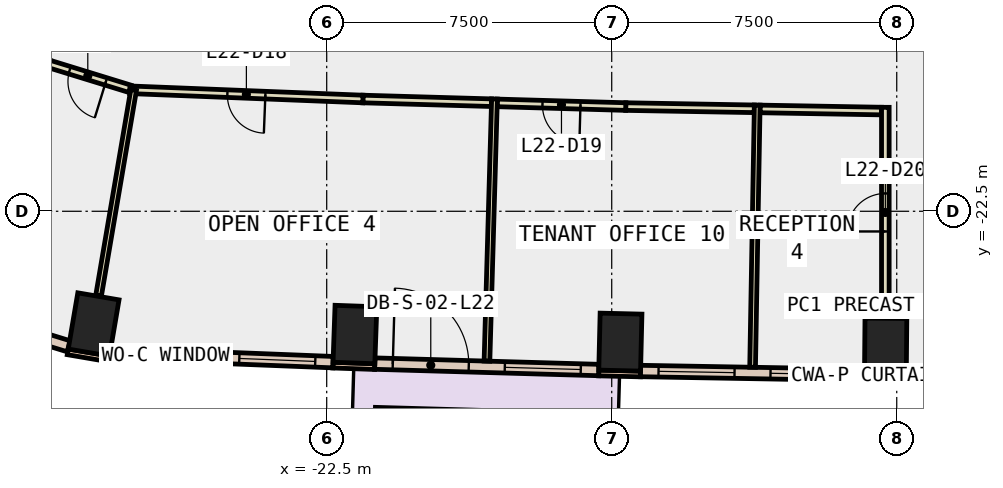
"""IFC4 building model, lengths in metres.
Left out: names, types, materials, properties, quantities, classifications, styles, units other than length and angle.
Written with IfcOpenShell. Run it as: python <this file> out.ifc"""

import sys

from ifc_helpers import new_model, si_unit, direction, frame, frame_2d, origin, origin_2d, place, context, subcontext, project, spatial, rectangle, extrude, element, fill, save


model = new_model("IFC4")
c1 = context("Model", 3, precision=1e-05, world=origin(), true_north=direction((0.0, 1.0)))
c2 = subcontext(c1, "Body", "Model", "MODEL_VIEW")
j1 = project(units=[si_unit("LENGTHUNIT", "METRE"), si_unit("PLANEANGLEUNIT", "RADIAN")], contexts=[c1])
p1 = place(None, origin())
s1 = spatial("IfcSite", under=j1, at=p1, CompositionType="ELEMENT")
p2 = place(p1, origin())
s2 = spatial("IfcBuilding", under=s1, at=p2, CompositionType="ELEMENT")
p3 = place(p2, frame((0.0, 0.0, 103.4)))
s3 = spatial("IfcBuildingStorey", under=s2, at=p3, CompositionType="ELEMENT", Elevation=103.4)
for number, where, z_axis, x_axis in (
    (1, (-28.633, -25.478, -0.4), (0.0, 0.0, 1.0), (-0.986, 0.168, 0.0)),
    (2, (-21.757, -25.743, -0.4), (0.0, 0.0, 1.0), (-0.999, 0.035, 0.0)),
    (3, (-14.773, -25.943, -0.4), (0.0, 0.0, 1.0), (-1.0, 0.024, 0.0)),
    (4, (-7.792, -26.066, -0.4), (0.0, 0.0, 1.0), (-1.0, 0.009, 0.0)),
):
    element("IfcColumn", number, at=place(p3, frame(where, z_axis=z_axis, x_axis=x_axis)), inside=s3, PredefinedType="COLUMN", context=c2, shape_type="SweptSolid", body=[
        extrude(rectangle(XDim=1.1, YDim=1.5, at=origin_2d()), origin(), (0.0, 0.0, 1.0), 4.2),
    ])
p4 = place(p3, frame((-29.314, -26.199, 0.0), z_axis=(0.0, 0.0, 1.0), x_axis=(0.985763338892, -0.168138751323, 0.0)))
e5 = element("IfcWall", 5, at=p4, inside=s3, PredefinedType="STANDARD", context=c2, shape_type="SweptSolid", body=[
    extrude(rectangle(XDim=1.101, YDim=0.15, at=frame_2d((0.55, 0.0))), origin(), (0.0, 0.0, 1.0), 3.8),
])
p5 = place(p3, frame((-22.336, -26.548, 0.0), z_axis=(0.0, 0.0, 1.0), x_axis=(0.999376638472, -0.035303462679, 0.0)))
e6 = element("IfcWall", 6, at=p5, inside=s3, PredefinedType="STANDARD", context=c2, shape_type="SweptSolid", body=[
    extrude(rectangle(XDim=1.1, YDim=0.15, at=frame_2d((0.55, 0.0))), origin(), (0.0, 0.0, 1.0), 3.8),
])
p6 = place(p3, frame((-15.343, -26.755, 0.0), z_axis=(0.0, 0.0, 1.0), x_axis=(0.999718180159, -0.023739424163, 0.0)))
e7 = element("IfcWall", 7, at=p6, inside=s3, PredefinedType="STANDARD", context=c2, shape_type="SweptSolid", body=[
    extrude(rectangle(XDim=1.1, YDim=0.15, at=frame_2d((0.55, 0.0))), origin(), (0.0, 0.0, 1.0), 3.8),
])
p7 = place(p3, frame((-8.349, -26.886, 0.0), z_axis=(0.0, 0.0, 1.0), x_axis=(0.99995860686, -0.009098602504, 0.0)))
e8 = element("IfcWall", 8, at=p7, inside=s3, PredefinedType="STANDARD", context=c2, shape_type="SweptSolid", body=[
    extrude(rectangle(XDim=1.1, YDim=0.15, at=frame_2d((0.55, 0.0))), origin(), (0.0, 0.0, 1.0), 3.8),
])
p8 = place(p3, frame((-28.205, -26.238, 0.0), z_axis=(0.0, 0.0, 1.0), x_axis=(0.99922113396, -0.039460428885, 0.0)))
e9 = element("IfcWall", 9, at=p8, inside=s3, PredefinedType="STANDARD", context=c2, shape_type="SweptSolid", body=[
    extrude(rectangle(XDim=5.878, YDim=0.3, at=frame_2d((2.939, 0.0))), origin(), (0.0, 0.0, 1.0), 3.8),
])
p9 = place(p8, frame((0.469, 0.0, 0.9)))
e10 = element("IfcOpeningElement", 10, at=p9, cuts=e9, PredefinedType="OPENING", context=c2, shape_type="SweptSolid", body=[
    extrude(rectangle(XDim=2.0, YDim=2.6, at=frame_2d((1.0, 1.3))), frame((0.0, 0.16, 0.0), z_axis=(0.0, -1.0, 0.0), x_axis=(1.0, 0.0, 0.0)), (0.0, 0.0, 1.0), 0.32),
])
p10 = place(p8, frame((3.408, 0.0, 0.9)))
e11 = element("IfcOpeningElement", 11, at=p10, cuts=e9, PredefinedType="OPENING", context=c2, shape_type="SweptSolid", body=[
    extrude(rectangle(XDim=2.0, YDim=2.6, at=frame_2d((1.0, 1.3))), frame((0.0, 0.16, 0.0), z_axis=(0.0, -1.0, 0.0), x_axis=(1.0, 0.0, 0.0)), (0.0, 0.0, 1.0), 0.32),
])
p11 = place(p3, frame((-21.235, -26.508, 0.0), z_axis=(0.0, 0.0, 1.0), x_axis=(0.999589583914, -0.028647229026, 0.0)))
e12 = element("IfcWall", 12, at=p11, inside=s3, PredefinedType="STANDARD", context=c2, shape_type="SweptSolid", body=[
    extrude(rectangle(XDim=5.897, YDim=0.3, at=frame_2d((2.949, 0.0))), origin(), (0.0, 0.0, 1.0), 3.8),
])
p12 = place(p11, frame((0.474, 0.0, 0.0)))
e13 = element("IfcOpeningElement", 13, at=p12, cuts=e12, PredefinedType="OPENING", context=c2, shape_type="SweptSolid", body=[
    extrude(rectangle(XDim=2.0, YDim=2.4, at=frame_2d((1.0, 1.2))), frame((0.0, 0.16, 0.0), z_axis=(0.0, -1.0, 0.0), x_axis=(1.0, 0.0, 0.0)), (0.0, 0.0, 1.0), 0.32),
])
p13 = place(p11, frame((3.423, 0.0, 0.9)))
e14 = element("IfcOpeningElement", 14, at=p13, cuts=e12, PredefinedType="OPENING", context=c2, shape_type="SweptSolid", body=[
    extrude(rectangle(XDim=2.0, YDim=2.6, at=frame_2d((1.0, 1.3))), frame((0.0, 0.16, 0.0), z_axis=(0.0, -1.0, 0.0), x_axis=(1.0, 0.0, 0.0)), (0.0, 0.0, 1.0), 0.32),
])
p14 = place(p3, frame((-14.242, -26.703, 0.0), z_axis=(0.0, 0.0, 1.0), x_axis=(0.999847261365, -0.017477240672, 0.0)))
e15 = element("IfcWall", 15, at=p14, inside=s3, PredefinedType="STANDARD", context=c2, shape_type="SweptSolid", body=[
    extrude(rectangle(XDim=5.895, YDim=0.3, at=frame_2d((2.948, 0.0))), origin(), (0.0, 0.0, 1.0), 3.8),
])
p15 = place(p14, frame((0.474, 0.0, 0.9)))
e16 = element("IfcOpeningElement", 16, at=p15, cuts=e15, PredefinedType="OPENING", context=c2, shape_type="SweptSolid", body=[
    extrude(rectangle(XDim=2.0, YDim=2.6, at=frame_2d((1.0, 1.3))), frame((0.0, 0.16, 0.0), z_axis=(0.0, -1.0, 0.0), x_axis=(1.0, 0.0, 0.0)), (0.0, 0.0, 1.0), 0.32),
])
p16 = place(p14, frame((3.421, 0.0, 0.9)))
e17 = element("IfcOpeningElement", 17, at=p16, cuts=e15, PredefinedType="OPENING", context=c2, shape_type="SweptSolid", body=[
    extrude(rectangle(XDim=2.0, YDim=2.6, at=frame_2d((1.0, 1.3))), frame((0.0, 0.16, 0.0), z_axis=(0.0, -1.0, 0.0), x_axis=(1.0, 0.0, 0.0)), (0.0, 0.0, 1.0), 0.32),
])
p17 = place(p3, frame((-32.924, -24.935, 0.0), z_axis=(0.0, 0.0, 1.0), x_axis=(0.955841433148, -0.293882892794, 0.0)))
e18 = element("IfcWall", 18, at=p17, inside=s3, PredefinedType="STANDARD", context=c2, shape_type="SweptSolid", body=[
    extrude(rectangle(XDim=3.804, YDim=0.3, at=frame_2d((1.902, 0.0))), origin(), (0.0, 0.0, 1.0), 3.8),
])
p18 = place(p17, frame((1.202, 0.0, 0.9)))
e19 = element("IfcOpeningElement", 19, at=p18, cuts=e18, PredefinedType="OPENING", context=c2, shape_type="SweptSolid", body=[
    extrude(rectangle(XDim=1.4, YDim=2.6, at=frame_2d((0.7, 1.3))), frame((0.0, 0.16, 0.0), z_axis=(0.0, -1.0, 0.0), x_axis=(1.0, 0.0, 0.0)), (0.0, 0.0, 1.0), 0.32),
])
p19 = place(p3, frame((-21.229, -28.059, 0.0), z_axis=(0.0, 0.0, 1.0), x_axis=(0.999589746939, -0.028641540027, 0.0)))
e20 = element("IfcWall", 20, at=p19, inside=s3, PredefinedType="STANDARD", context=c2, shape_type="SweptSolid", body=[
    extrude(rectangle(XDim=5.796, YDim=0.8, at=frame_2d((2.898, 0.0))), origin(), (0.0, 0.0, 1.0), 0.8),
])
p20 = place(p3, frame((-27.676, -19.278, 0.0), z_axis=(0.0, 0.0, 1.0), x_axis=(-0.95581080774, 0.293982482143, 0.0)))
e21 = element("IfcWall", 21, at=p20, inside=s3, PredefinedType="PARTITIONING", context=c2, shape_type="SweptSolid", body=[
    extrude(rectangle(XDim=2.324, YDim=0.2, at=frame_2d((1.162, 0.0))), origin(), (0.0, 0.0, 1.0), 3.8),
])
p21 = place(p20, frame((0.662, 0.0, 0.0)))
e22 = element("IfcOpeningElement", 22, at=p21, cuts=e21, PredefinedType="OPENING", context=c2, shape_type="SweptSolid", body=[
    extrude(rectangle(XDim=1.0, YDim=2.1, at=frame_2d((0.5, 1.05))), frame((0.0, 0.11, 0.0), z_axis=(0.0, -1.0, 0.0), x_axis=(1.0, 0.0, 0.0)), (0.0, 0.0, 1.0), 0.22),
])
p22 = place(p3, frame((-18.163, -19.643, 0.0), z_axis=(0.0, 0.0, 1.0), x_axis=(-0.999588017684, 0.028701827504, 0.0)))
e23 = element("IfcWall", 23, at=p22, inside=s3, PredefinedType="PARTITIONING", context=c2, shape_type="SweptSolid", body=[
    extrude(rectangle(XDim=3.385, YDim=0.2, at=frame_2d((1.693, 0.0))), origin(), (0.0, 0.0, 1.0), 3.8),
])
p23 = place(p3, frame((-21.547, -19.546, 0.0), z_axis=(0.0, 0.0, 1.0), x_axis=(-0.999216450883, 0.039578836331, 0.0)))
e24 = element("IfcWall", 24, at=p23, inside=s3, PredefinedType="PARTITIONING", context=c2, shape_type="SweptSolid", body=[
    extrude(rectangle(XDim=6.138, YDim=0.2, at=frame_2d((3.069, 0.0))), origin(), (0.0, 0.0, 1.0), 3.8),
])
p24 = place(p23, frame((2.569, 0.0, 0.0)))
e25 = element("IfcOpeningElement", 25, at=p24, cuts=e24, PredefinedType="OPENING", context=c2, shape_type="SweptSolid", body=[
    extrude(rectangle(XDim=1.0, YDim=2.1, at=frame_2d((0.5, 1.05))), frame((0.0, 0.11, 0.0), z_axis=(0.0, -1.0, 0.0), x_axis=(1.0, 0.0, 0.0)), (0.0, 0.0, 1.0), 0.22),
])
p25 = place(p3, frame((-11.248, -19.804, 0.0), z_axis=(0.0, 0.0, 1.0), x_axis=(-0.999848794654, 0.017389302123, 0.0)))
e26 = element("IfcWall", 26, at=p25, inside=s3, PredefinedType="PARTITIONING", context=c2, shape_type="SweptSolid", body=[
    extrude(rectangle(XDim=3.384, YDim=0.2, at=frame_2d((1.692, 0.0))), origin(), (0.0, 0.0, 1.0), 3.8),
])
p26 = place(p3, frame((-14.631, -19.745, 0.0), z_axis=(0.0, 0.0, 1.0), x_axis=(-0.999587482491, 0.028720460441, 0.0)))
e27 = element("IfcWall", 27, at=p26, inside=s3, PredefinedType="PARTITIONING", context=c2, shape_type="SweptSolid", body=[
    extrude(rectangle(XDim=3.383, YDim=0.2, at=frame_2d((1.692, 0.0))), origin(), (0.0, 0.0, 1.0), 3.8),
])
p27 = place(p26, frame((1.192, 0.0, 0.0)))
e28 = element("IfcOpeningElement", 28, at=p27, cuts=e27, PredefinedType="OPENING", context=c2, shape_type="SweptSolid", body=[
    extrude(rectangle(XDim=1.0, YDim=2.1, at=frame_2d((0.5, 1.05))), frame((0.0, 0.11, 0.0), z_axis=(0.0, -1.0, 0.0), x_axis=(1.0, 0.0, 0.0)), (0.0, 0.0, 1.0), 0.22),
])
p28 = place(p3, frame((-7.9, -19.863, 0.0), z_axis=(0.0, 0.0, 1.0), x_axis=(-0.999845883554, 0.017555886191, 0.0)))
e29 = element("IfcWall", 29, at=p28, inside=s3, PredefinedType="PARTITIONING", context=c2, shape_type="SweptSolid", body=[
    extrude(rectangle(XDim=3.198, YDim=0.2, at=frame_2d((1.599, 0.0))), origin(), (0.0, 0.0, 1.0), 3.8),
])
p29 = place(p3, frame((-7.8, -25.296, 0.0), z_axis=(0.0, 0.0, 1.0), x_axis=(0.0, 1.0, 0.0)))
e30 = element("IfcWall", 30, at=p29, inside=s3, PredefinedType="PARTITIONING", context=c2, shape_type="SweptSolid", body=[
    extrude(rectangle(XDim=5.531, YDim=0.2, at=frame_2d((2.766, 0.0))), origin(), (0.0, 0.0, 1.0), 3.8),
])
p30 = place(p29, frame((2.265, 0.0, 0.0)))
e31 = element("IfcOpeningElement", 31, at=p30, cuts=e30, PredefinedType="OPENING", context=c2, shape_type="SweptSolid", body=[
    extrude(rectangle(XDim=1.0, YDim=2.1, at=frame_2d((0.5, 1.05))), frame((0.0, 0.11, 0.0), z_axis=(0.0, -1.0, 0.0), x_axis=(1.0, 0.0, 0.0)), (0.0, 0.0, 1.0), 0.22),
])
p31 = place(p3, frame((-27.58, -19.307, 0.0), z_axis=(0.0, 0.0, 1.0), x_axis=(-0.168089900424, -0.98577167, 0.0)))
e32 = element("IfcWall", 32, at=p31, inside=s3, PredefinedType="PARTITIONING", context=c2, shape_type="SweptSolid", body=[
    extrude(rectangle(XDim=5.49, YDim=0.15, at=frame_2d((2.745, 0.0))), origin(), (0.0, 0.0, 1.0), 3.8),
])
p32 = place(p3, frame((-18.085, -19.545, 0.0), z_axis=(0.0, 0.0, 1.0), x_axis=(-0.02869106823, -0.999588326564, 0.0)))
e33 = element("IfcWall", 33, at=p32, inside=s3, PredefinedType="PARTITIONING", context=c2, shape_type="SweptSolid", body=[
    extrude(rectangle(XDim=6.901, YDim=0.15, at=frame_2d((3.451, 0.0))), origin(), (0.0, 0.0, 1.0), 3.8),
])
p33 = place(p3, frame((-11.171, -19.706, 0.0), z_axis=(0.0, 0.0, 1.0), x_axis=(-0.017691335128, -0.999843496084, 0.0)))
e34 = element("IfcWall", 34, at=p33, inside=s3, PredefinedType="PARTITIONING", context=c2, shape_type="SweptSolid", body=[
    extrude(rectangle(XDim=6.9, YDim=0.15, at=frame_2d((3.45, 0.0))), origin(), (0.0, 0.0, 1.0), 3.8),
])
p34 = place(p9, origin())
e35 = element("IfcWindow", 35, at=p34, inside=s3, PartitioningType="SINGLE_PANEL", PredefinedType="WINDOW", context=c2, shape_type="SweptSolid", body=[
    extrude(rectangle(XDim=2.0, YDim=2.6, at=frame_2d((1.0, 1.3))), frame((0.0, 0.03, 0.0), z_axis=(0.0, -1.0, 0.0), x_axis=(1.0, 0.0, 0.0)), (0.0, 0.0, 1.0), 0.06),
])
fill(e10, e35)
p35 = place(p10, origin())
e36 = element("IfcWindow", 36, at=p35, inside=s3, PartitioningType="SINGLE_PANEL", PredefinedType="WINDOW", context=c2, shape_type="SweptSolid", body=[
    extrude(rectangle(XDim=2.0, YDim=2.6, at=frame_2d((1.0, 1.3))), frame((0.0, 0.03, 0.0), z_axis=(0.0, -1.0, 0.0), x_axis=(1.0, 0.0, 0.0)), (0.0, 0.0, 1.0), 0.06),
])
fill(e11, e36)
p36 = place(p12, origin())
e37 = element("IfcDoor", 37, at=p36, inside=s3, OperationType="SLIDING_TO_LEFT", PredefinedType="DOOR", context=c2, shape_type="SweptSolid", body=[
    extrude(rectangle(XDim=2.0, YDim=2.4, at=frame_2d((1.0, 1.2))), frame((0.0, 0.025, 0.0), z_axis=(0.0, -1.0, 0.0), x_axis=(1.0, 0.0, 0.0)), (0.0, 0.0, 1.0), 0.05),
])
fill(e13, e37)
p37 = place(p13, origin())
e38 = element("IfcWindow", 38, at=p37, inside=s3, PartitioningType="SINGLE_PANEL", PredefinedType="WINDOW", context=c2, shape_type="SweptSolid", body=[
    extrude(rectangle(XDim=2.0, YDim=2.6, at=frame_2d((1.0, 1.3))), frame((0.0, 0.03, 0.0), z_axis=(0.0, -1.0, 0.0), x_axis=(1.0, 0.0, 0.0)), (0.0, 0.0, 1.0), 0.06),
])
fill(e14, e38)
p38 = place(p15, origin())
e39 = element("IfcWindow", 39, at=p38, inside=s3, PartitioningType="SINGLE_PANEL", PredefinedType="WINDOW", context=c2, shape_type="SweptSolid", body=[
    extrude(rectangle(XDim=2.0, YDim=2.6, at=frame_2d((1.0, 1.3))), frame((0.0, 0.03, 0.0), z_axis=(0.0, -1.0, 0.0), x_axis=(1.0, 0.0, 0.0)), (0.0, 0.0, 1.0), 0.06),
])
fill(e16, e39)
p39 = place(p16, origin())
e40 = element("IfcWindow", 40, at=p39, inside=s3, PartitioningType="SINGLE_PANEL", PredefinedType="WINDOW", context=c2, shape_type="SweptSolid", body=[
    extrude(rectangle(XDim=2.0, YDim=2.6, at=frame_2d((1.0, 1.3))), frame((0.0, 0.03, 0.0), z_axis=(0.0, -1.0, 0.0), x_axis=(1.0, 0.0, 0.0)), (0.0, 0.0, 1.0), 0.06),
])
fill(e17, e40)
p40 = place(p21, origin())
e41 = element("IfcDoor", 41, at=p40, inside=s3, OperationType="SINGLE_SWING_LEFT", PredefinedType="DOOR", context=c2, shape_type="SweptSolid", body=[
    extrude(rectangle(XDim=1.0, YDim=2.1, at=frame_2d((0.5, 1.05))), frame((0.0, 0.025, 0.0), z_axis=(0.0, -1.0, 0.0), x_axis=(1.0, 0.0, 0.0)), (0.0, 0.0, 1.0), 0.05),
])
fill(e22, e41)
p41 = place(p24, origin())
e42 = element("IfcDoor", 42, at=p41, inside=s3, OperationType="SINGLE_SWING_LEFT", PredefinedType="DOOR", context=c2, shape_type="SweptSolid", body=[
    extrude(rectangle(XDim=1.0, YDim=2.1, at=frame_2d((0.5, 1.05))), frame((0.0, 0.025, 0.0), z_axis=(0.0, -1.0, 0.0), x_axis=(1.0, 0.0, 0.0)), (0.0, 0.0, 1.0), 0.05),
])
fill(e25, e42)
p42 = place(p27, origin())
e43 = element("IfcDoor", 43, at=p42, inside=s3, OperationType="SINGLE_SWING_RIGHT", PredefinedType="DOOR", context=c2, shape_type="SweptSolid", body=[
    extrude(rectangle(XDim=1.0, YDim=2.1, at=frame_2d((0.5, 1.05))), frame((0.0, 0.025, 0.0), z_axis=(0.0, -1.0, 0.0), x_axis=(1.0, 0.0, 0.0)), (0.0, 0.0, 1.0), 0.05),
])
fill(e28, e43)
p43 = place(p30, origin())
e44 = element("IfcDoor", 44, at=p43, inside=s3, OperationType="SINGLE_SWING_LEFT", PredefinedType="DOOR", context=c2, shape_type="SweptSolid", body=[
    extrude(rectangle(XDim=1.0, YDim=2.1, at=frame_2d((0.5, 1.05))), frame((0.0, 0.025, 0.0), z_axis=(0.0, -1.0, 0.0), x_axis=(1.0, 0.0, 0.0)), (0.0, 0.0, 1.0), 0.05),
])
fill(e31, e44)
save(model, sys.argv[1])
